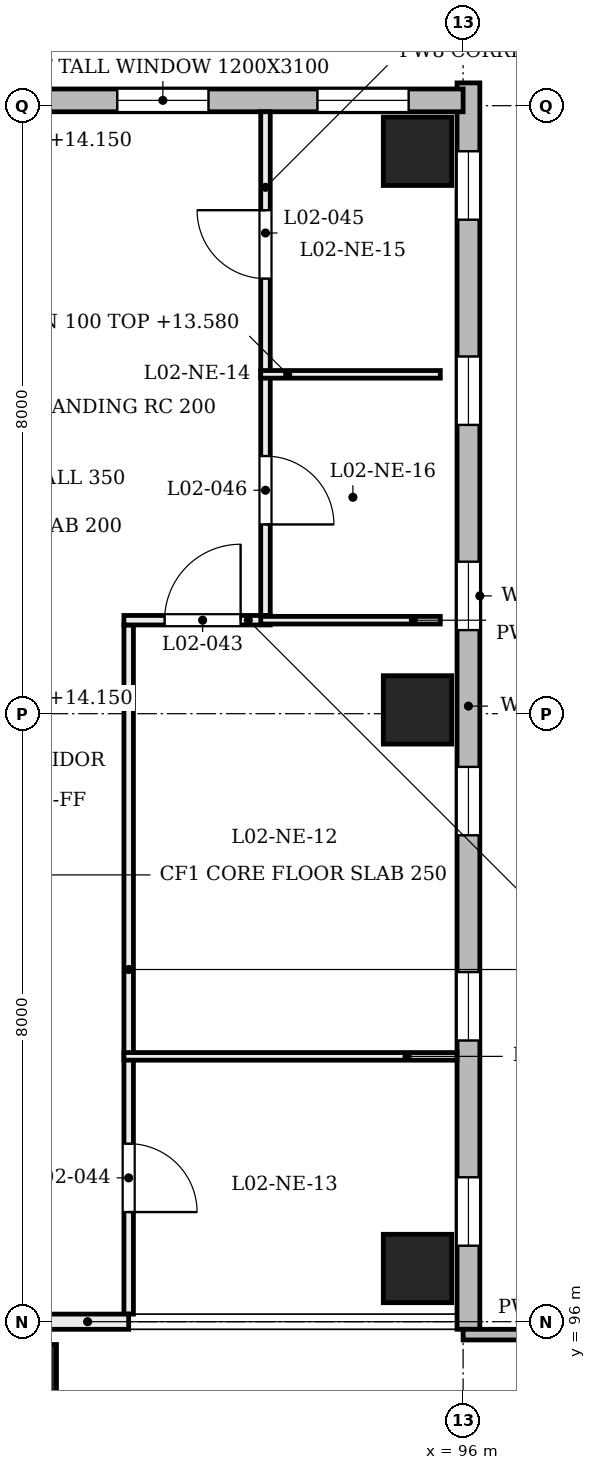
"""IFC4 building model, lengths in metres.
Left out: names, types, materials, properties, quantities, classifications, styles, units other than length and angle.
Written with IfcOpenShell. Run it as: python <this file> out.ifc"""

import sys

from ifc_helpers import new_model, si_unit, direction, frame, frame_2d, origin, origin_2d, place, context, subcontext, project, spatial, rectangle, extrude, element, fill, save


model = new_model("IFC4")
c1 = context("Model", 3, precision=1e-05, world=origin(), true_north=direction((0.0, 1.0)))
c2 = subcontext(c1, "Body", "Model", "MODEL_VIEW")
j1 = project(units=[si_unit("LENGTHUNIT", "METRE"), si_unit("PLANEANGLEUNIT", "RADIAN")], contexts=[c1])
p1 = place(None, origin())
s1 = spatial("IfcSite", under=j1, at=p1, CompositionType="ELEMENT")
p2 = place(p1, origin())
s2 = spatial("IfcBuilding", under=s1, at=p2, CompositionType="ELEMENT")
p3 = place(p2, frame((0.0, 0.0, 9.6)))
s3 = spatial("IfcBuildingStorey", under=s2, at=p3, CompositionType="ELEMENT", Elevation=9.6)
for number, where, z_axis, x_axis in (
    (1, (95.4, 96.7, 0.0), (0.0, 0.0, 1.0), (1.0, 0.0, 0.0)),
    (2, (95.4, 104.05, 0.0), (0.0, 0.0, 1.0), (1.0, 0.0, 0.0)),
    (3, (95.4, 111.4, 0.0), (0.0, 0.0, 1.0), (1.0, 0.0, 0.0)),
):
    element("IfcColumn", number, at=place(p3, frame(where, z_axis=z_axis, x_axis=x_axis)), inside=s3, PredefinedType="COLUMN", context=c2, shape_type="SweptSolid", body=[
        extrude(rectangle(XDim=0.9, YDim=0.9, at=origin_2d()), origin(), (0.0, 0.0, 1.0), 4.8),
    ])
p4 = place(p3, frame((90.0, 95.3, 0.0), z_axis=(0.203962208122, 0.0, 0.978978762618), x_axis=(0.0, 1.0, 0.0)))
e4 = element("IfcColumn", 4, at=p4, inside=s3, PredefinedType="COLUMN", context=c2, shape_type="SweptSolid", body=[
    extrude(rectangle(XDim=0.8, YDim=0.8, at=origin_2d()), origin(), (0.0, 0.0, 1.0), 4.903),
])
p5 = place(p3, frame((96.07, 95.9, 0.0), z_axis=(0.0, 0.0, 1.0), x_axis=(0.0, 1.0, 0.0)))
e5 = element("IfcWall", 5, at=p5, inside=s3, PredefinedType="SOLIDWALL", context=c2, shape_type="SweptSolid", body=[
    extrude(rectangle(XDim=16.4, YDim=0.3, at=frame_2d((8.2, 0.0))), origin(), (0.0, 0.0, 1.0), 3.9),
])
p6 = place(p5, frame((1.1, 0.0, 0.75)))
e6 = element("IfcOpeningElement", 6, at=p6, cuts=e5, PredefinedType="OPENING", context=c2, shape_type="SweptSolid", body=[
    extrude(rectangle(XDim=0.9, YDim=3.1, at=frame_2d((0.45, 1.55))), frame((0.0, 0.16, 0.0), z_axis=(0.0, -1.0, 0.0), x_axis=(1.0, 0.0, 0.0)), (0.0, 0.0, 1.0), 0.32),
])
p7 = place(p5, frame((3.8, 0.0, 0.75)))
e7 = element("IfcOpeningElement", 7, at=p7, cuts=e5, PredefinedType="OPENING", context=c2, shape_type="SweptSolid", body=[
    extrude(rectangle(XDim=0.9, YDim=3.1, at=frame_2d((0.45, 1.55))), frame((0.0, 0.16, 0.0), z_axis=(0.0, -1.0, 0.0), x_axis=(1.0, 0.0, 0.0)), (0.0, 0.0, 1.0), 0.32),
])
p8 = place(p5, frame((6.5, 0.0, 0.75)))
e8 = element("IfcOpeningElement", 8, at=p8, cuts=e5, PredefinedType="OPENING", context=c2, shape_type="SweptSolid", body=[
    extrude(rectangle(XDim=0.9, YDim=3.1, at=frame_2d((0.45, 1.55))), frame((0.0, 0.16, 0.0), z_axis=(0.0, -1.0, 0.0), x_axis=(1.0, 0.0, 0.0)), (0.0, 0.0, 1.0), 0.32),
])
p9 = place(p5, frame((9.2, 0.0, 0.75)))
e9 = element("IfcOpeningElement", 9, at=p9, cuts=e5, PredefinedType="OPENING", context=c2, shape_type="SweptSolid", body=[
    extrude(rectangle(XDim=0.9, YDim=3.1, at=frame_2d((0.45, 1.55))), frame((0.0, 0.16, 0.0), z_axis=(0.0, -1.0, 0.0), x_axis=(1.0, 0.0, 0.0)), (0.0, 0.0, 1.0), 0.32),
])
p10 = place(p5, frame((11.9, 0.0, 0.75)))
e10 = element("IfcOpeningElement", 10, at=p10, cuts=e5, PredefinedType="OPENING", context=c2, shape_type="SweptSolid", body=[
    extrude(rectangle(XDim=0.9, YDim=3.1, at=frame_2d((0.45, 1.55))), frame((0.0, 0.16, 0.0), z_axis=(0.0, -1.0, 0.0), x_axis=(1.0, 0.0, 0.0)), (0.0, 0.0, 1.0), 0.32),
])
p11 = place(p5, frame((14.6, 0.0, 0.75)))
e11 = element("IfcOpeningElement", 11, at=p11, cuts=e5, PredefinedType="OPENING", context=c2, shape_type="SweptSolid", body=[
    extrude(rectangle(XDim=0.9, YDim=3.1, at=frame_2d((0.45, 1.55))), frame((0.0, 0.16, 0.0), z_axis=(0.0, -1.0, 0.0), x_axis=(1.0, 0.0, 0.0)), (0.0, 0.0, 1.0), 0.32),
])
p12 = place(p3, frame((88.1, 112.07, 0.0), z_axis=(0.0, 0.0, 1.0), x_axis=(1.0, 0.0, 0.0)))
e12 = element("IfcWall", 12, at=p12, inside=s3, PredefinedType="SOLIDWALL", context=c2, shape_type="SweptSolid", body=[
    extrude(rectangle(XDim=7.9, YDim=0.3, at=frame_2d((3.95, 0.0))), origin(), (0.0, 0.0, 1.0), 3.9),
])
p13 = place(p12, frame((0.717, 0.0, 0.75)))
e13 = element("IfcOpeningElement", 13, at=p13, cuts=e12, PredefinedType="OPENING", context=c2, shape_type="SweptSolid", body=[
    extrude(rectangle(XDim=1.2, YDim=3.1, at=frame_2d((0.6, 1.55))), frame((0.0, 0.16, 0.0), z_axis=(0.0, -1.0, 0.0), x_axis=(1.0, 0.0, 0.0)), (0.0, 0.0, 1.0), 0.32),
])
p14 = place(p12, frame((3.35, 0.0, 0.75)))
e14 = element("IfcOpeningElement", 14, at=p14, cuts=e12, PredefinedType="OPENING", context=c2, shape_type="SweptSolid", body=[
    extrude(rectangle(XDim=1.2, YDim=3.1, at=frame_2d((0.6, 1.55))), frame((0.0, 0.16, 0.0), z_axis=(0.0, -1.0, 0.0), x_axis=(1.0, 0.0, 0.0)), (0.0, 0.0, 1.0), 0.32),
])
p15 = place(p12, frame((5.983, 0.0, 0.75)))
e15 = element("IfcOpeningElement", 15, at=p15, cuts=e12, PredefinedType="OPENING", context=c2, shape_type="SweptSolid", body=[
    extrude(rectangle(XDim=1.2, YDim=3.1, at=frame_2d((0.6, 1.55))), frame((0.0, 0.16, 0.0), z_axis=(0.0, -1.0, 0.0), x_axis=(1.0, 0.0, 0.0)), (0.0, 0.0, 1.0), 0.32),
])
p16 = place(p3, frame((96.0, 95.83, 0.0), z_axis=(0.0, 0.0, 1.0), x_axis=(1.0, 0.0, 0.0)))
e16 = element("IfcWall", 16, at=p16, inside=s3, PredefinedType="SOLIDWALL", context=c2, shape_type="SweptSolid", body=[
    extrude(rectangle(XDim=2.0, YDim=0.14, at=frame_2d((1.0, 0.0))), origin(), (0.0, 0.0, 1.0), 3.9),
])
p17 = place(p3, frame((91.6, 96.1, 0.0), z_axis=(0.0, 0.0, 1.0), x_axis=(0.0, 1.0, 0.0)))
e17 = element("IfcWall", 17, at=p17, inside=s3, PredefinedType="PARTITIONING", context=c2, shape_type="SweptSolid", body=[
    extrude(rectangle(XDim=9.068, YDim=0.125, at=frame_2d((4.534, 0.0))), origin(), (0.0, 0.0, 1.0), 3.88),
])
p18 = place(p17, frame((1.343, 0.0, 0.0)))
e18 = element("IfcOpeningElement", 18, at=p18, cuts=e17, PredefinedType="OPENING", context=c2, shape_type="SweptSolid", body=[
    extrude(rectangle(XDim=0.9, YDim=2.1, at=frame_2d((0.45, 1.05))), frame((0.0, 0.073, 0.0), z_axis=(0.0, -1.0, 0.0), x_axis=(1.0, 0.0, 0.0)), (0.0, 0.0, 1.0), 0.145),
])
p19 = place(p3, frame((93.4, 105.293, 0.0), z_axis=(0.0, 0.0, 1.0), x_axis=(0.0, 1.0, 0.0)))
e19 = element("IfcWall", 19, at=p19, inside=s3, PredefinedType="PARTITIONING", context=c2, shape_type="SweptSolid", body=[
    extrude(rectangle(XDim=6.627, YDim=0.125, at=frame_2d((3.313, 0.0))), origin(), (0.0, 0.0, 1.0), 3.88),
])
p20 = place(p19, frame((4.432, 0.0, 0.0)))
e20 = element("IfcOpeningElement", 20, at=p20, cuts=e19, PredefinedType="OPENING", context=c2, shape_type="SweptSolid", body=[
    extrude(rectangle(XDim=0.9, YDim=2.1, at=frame_2d((0.45, 1.05))), frame((0.0, 0.073, 0.0), z_axis=(0.0, -1.0, 0.0), x_axis=(1.0, 0.0, 0.0)), (0.0, 0.0, 1.0), 0.145),
])
p21 = place(p19, frame((1.197, 0.0, 0.0)))
e21 = element("IfcOpeningElement", 21, at=p21, cuts=e19, PredefinedType="OPENING", context=c2, shape_type="SweptSolid", body=[
    extrude(rectangle(XDim=0.9, YDim=2.1, at=frame_2d((0.45, 1.05))), frame((0.0, 0.073, 0.0), z_axis=(0.0, -1.0, 0.0), x_axis=(1.0, 0.0, 0.0)), (0.0, 0.0, 1.0), 0.145),
])
p22 = place(p3, frame((91.538, 99.491, 0.0), z_axis=(0.0, 0.0, 1.0), x_axis=(1.0, 0.0, 0.0)))
e22 = element("IfcWall", 22, at=p22, inside=s3, PredefinedType="PARTITIONING", context=c2, shape_type="SweptSolid", body=[
    extrude(rectangle(XDim=4.382, YDim=0.1, at=frame_2d((2.191, 0.0))), origin(), (0.0, 0.0, 1.0), 3.88),
])
p23 = place(p3, frame((91.538, 105.23, 0.0), z_axis=(0.0, 0.0, 1.0), x_axis=(1.0, 0.0, 0.0)))
e23 = element("IfcWall", 23, at=p23, inside=s3, PredefinedType="PARTITIONING", context=c2, shape_type="SweptSolid", body=[
    extrude(rectangle(XDim=1.925, YDim=0.125, at=frame_2d((0.962, 0.0))), origin(), (0.0, 0.0, 1.0), 4.56),
])
p24 = place(p23, frame((0.535, 0.0, 0.0)))
e24 = element("IfcOpeningElement", 24, at=p24, cuts=e23, PredefinedType="OPENING", context=c2, shape_type="SweptSolid", body=[
    extrude(rectangle(XDim=1.0, YDim=2.1, at=frame_2d((0.5, 1.05))), frame((0.0, 0.073, 0.0), z_axis=(0.0, -1.0, 0.0), x_axis=(1.0, 0.0, 0.0)), (0.0, 0.0, 1.0), 0.145),
])
for number, where, z_axis, x_axis in (
    (25, (93.337, 105.23, 0.0), (0.0, 0.0, 1.0), (1.0, 0.0, 0.0)),
    (26, (93.337, 108.465, 0.0), (0.0, 0.0, 1.0), (1.0, 0.0, 0.0)),
):
    element("IfcWall", number, at=place(p3, frame(where, z_axis=z_axis, x_axis=x_axis)), inside=s3, PredefinedType="PARTITIONING", context=c2, shape_type="SweptSolid", body=[
        extrude(rectangle(XDim=2.363, YDim=0.1, at=frame_2d((1.181, 0.0))), origin(), (0.0, 0.0, 1.0), 3.98),
    ])
p25 = place(p3, frame((88.0, 96.0, 0.0), z_axis=(0.0, 0.0, 1.0), x_axis=(1.0, 0.0, 0.0)))
e27 = element("IfcWall", 27, at=p25, inside=s3, PredefinedType="PARTITIONING", context=c2, shape_type="SweptSolid", body=[
    extrude(rectangle(XDim=3.6, YDim=0.2, at=frame_2d((1.8, 0.0))), origin(), (0.0, 0.0, 1.0), 3.88),
])
p26 = place(p25, frame((0.9, 0.0, 0.0)))
e28 = element("IfcOpeningElement", 28, at=p26, cuts=e27, PredefinedType="OPENING", context=c2, shape_type="SweptSolid", body=[
    extrude(rectangle(XDim=0.9, YDim=2.1, at=frame_2d((0.45, 1.05))), frame((0.0, 0.11, 0.0), z_axis=(0.0, -1.0, 0.0), x_axis=(1.0, 0.0, 0.0)), (0.0, 0.0, 1.0), 0.22),
])
p27 = place(p6, origin())
e29 = element("IfcWindow", 29, at=p27, inside=s3, PartitioningType="SINGLE_PANEL", PredefinedType="WINDOW", context=c2, shape_type="SweptSolid", body=[
    extrude(rectangle(XDim=0.9, YDim=3.1, at=frame_2d((0.45, 1.55))), frame((0.0, 0.03, 0.0), z_axis=(0.0, -1.0, 0.0), x_axis=(1.0, 0.0, 0.0)), (0.0, 0.0, 1.0), 0.06),
])
fill(e6, e29)
p28 = place(p7, origin())
e30 = element("IfcWindow", 30, at=p28, inside=s3, PartitioningType="SINGLE_PANEL", PredefinedType="WINDOW", context=c2, shape_type="SweptSolid", body=[
    extrude(rectangle(XDim=0.9, YDim=3.1, at=frame_2d((0.45, 1.55))), frame((0.0, 0.03, 0.0), z_axis=(0.0, -1.0, 0.0), x_axis=(1.0, 0.0, 0.0)), (0.0, 0.0, 1.0), 0.06),
])
fill(e7, e30)
p29 = place(p8, origin())
e31 = element("IfcWindow", 31, at=p29, inside=s3, PartitioningType="SINGLE_PANEL", PredefinedType="WINDOW", context=c2, shape_type="SweptSolid", body=[
    extrude(rectangle(XDim=0.9, YDim=3.1, at=frame_2d((0.45, 1.55))), frame((0.0, 0.03, 0.0), z_axis=(0.0, -1.0, 0.0), x_axis=(1.0, 0.0, 0.0)), (0.0, 0.0, 1.0), 0.06),
])
fill(e8, e31)
p30 = place(p9, origin())
e32 = element("IfcWindow", 32, at=p30, inside=s3, PartitioningType="SINGLE_PANEL", PredefinedType="WINDOW", context=c2, shape_type="SweptSolid", body=[
    extrude(rectangle(XDim=0.9, YDim=3.1, at=frame_2d((0.45, 1.55))), frame((0.0, 0.03, 0.0), z_axis=(0.0, -1.0, 0.0), x_axis=(1.0, 0.0, 0.0)), (0.0, 0.0, 1.0), 0.06),
])
fill(e9, e32)
p31 = place(p10, origin())
e33 = element("IfcWindow", 33, at=p31, inside=s3, PartitioningType="SINGLE_PANEL", PredefinedType="WINDOW", context=c2, shape_type="SweptSolid", body=[
    extrude(rectangle(XDim=0.9, YDim=3.1, at=frame_2d((0.45, 1.55))), frame((0.0, 0.03, 0.0), z_axis=(0.0, -1.0, 0.0), x_axis=(1.0, 0.0, 0.0)), (0.0, 0.0, 1.0), 0.06),
])
fill(e10, e33)
p32 = place(p11, origin())
e34 = element("IfcWindow", 34, at=p32, inside=s3, PartitioningType="SINGLE_PANEL", PredefinedType="WINDOW", context=c2, shape_type="SweptSolid", body=[
    extrude(rectangle(XDim=0.9, YDim=3.1, at=frame_2d((0.45, 1.55))), frame((0.0, 0.03, 0.0), z_axis=(0.0, -1.0, 0.0), x_axis=(1.0, 0.0, 0.0)), (0.0, 0.0, 1.0), 0.06),
])
fill(e11, e34)
p33 = place(p14, origin())
e35 = element("IfcWindow", 35, at=p33, inside=s3, PartitioningType="SINGLE_PANEL", PredefinedType="WINDOW", context=c2, shape_type="SweptSolid", body=[
    extrude(rectangle(XDim=1.2, YDim=3.1, at=frame_2d((0.6, 1.55))), frame((0.0, 0.03, 0.0), z_axis=(0.0, -1.0, 0.0), x_axis=(1.0, 0.0, 0.0)), (0.0, 0.0, 1.0), 0.06),
])
fill(e14, e35)
p34 = place(p15, origin())
e36 = element("IfcWindow", 36, at=p34, inside=s3, PartitioningType="SINGLE_PANEL", PredefinedType="WINDOW", context=c2, shape_type="SweptSolid", body=[
    extrude(rectangle(XDim=1.2, YDim=3.1, at=frame_2d((0.6, 1.55))), frame((0.0, 0.03, 0.0), z_axis=(0.0, -1.0, 0.0), x_axis=(1.0, 0.0, 0.0)), (0.0, 0.0, 1.0), 0.06),
])
fill(e15, e36)
p35 = place(p24, frame((1.0, 0.0, 0.0), z_axis=(0.0, 0.0, 1.0), x_axis=(-1.0, 0.0, 0.0)))
e37 = element("IfcDoor", 37, at=p35, inside=s3, OperationType="SINGLE_SWING_RIGHT", PredefinedType="DOOR", context=c2, shape_type="SweptSolid", body=[
    extrude(rectangle(XDim=1.0, YDim=2.1, at=frame_2d((0.5, 1.05))), frame((0.0, 0.025, 0.0), z_axis=(0.0, -1.0, 0.0), x_axis=(1.0, 0.0, 0.0)), (0.0, 0.0, 1.0), 0.05),
])
fill(e24, e37)
p36 = place(p18, frame((0.9, 0.0, 0.0), z_axis=(0.0, 0.0, 1.0), x_axis=(-1.0, 0.0, 0.0)))
e38 = element("IfcDoor", 38, at=p36, inside=s3, OperationType="SINGLE_SWING_LEFT", PredefinedType="DOOR", context=c2, shape_type="SweptSolid", body=[
    extrude(rectangle(XDim=0.9, YDim=2.1, at=frame_2d((0.45, 1.05))), frame((0.0, 0.025, 0.0), z_axis=(0.0, -1.0, 0.0), x_axis=(1.0, 0.0, 0.0)), (0.0, 0.0, 1.0), 0.05),
])
fill(e18, e38)
p37 = place(p20, frame((0.9, 0.0, 0.0), z_axis=(0.0, 0.0, 1.0), x_axis=(-1.0, 0.0, 0.0)))
e39 = element("IfcDoor", 39, at=p37, inside=s3, OperationType="SINGLE_SWING_RIGHT", PredefinedType="DOOR", context=c2, shape_type="SweptSolid", body=[
    extrude(rectangle(XDim=0.9, YDim=2.1, at=frame_2d((0.45, 1.05))), frame((0.0, 0.025, 0.0), z_axis=(0.0, -1.0, 0.0), x_axis=(1.0, 0.0, 0.0)), (0.0, 0.0, 1.0), 0.05),
])
fill(e20, e39)
p38 = place(p21, frame((0.9, 0.0, 0.0), z_axis=(0.0, 0.0, 1.0), x_axis=(-1.0, 0.0, 0.0)))
e40 = element("IfcDoor", 40, at=p38, inside=s3, OperationType="SINGLE_SWING_LEFT", PredefinedType="DOOR", context=c2, shape_type="SweptSolid", body=[
    extrude(rectangle(XDim=0.9, YDim=2.1, at=frame_2d((0.45, 1.05))), frame((0.0, 0.025, 0.0), z_axis=(0.0, -1.0, 0.0), x_axis=(1.0, 0.0, 0.0)), (0.0, 0.0, 1.0), 0.05),
])
fill(e21, e40)
save(model, sys.argv[1])
